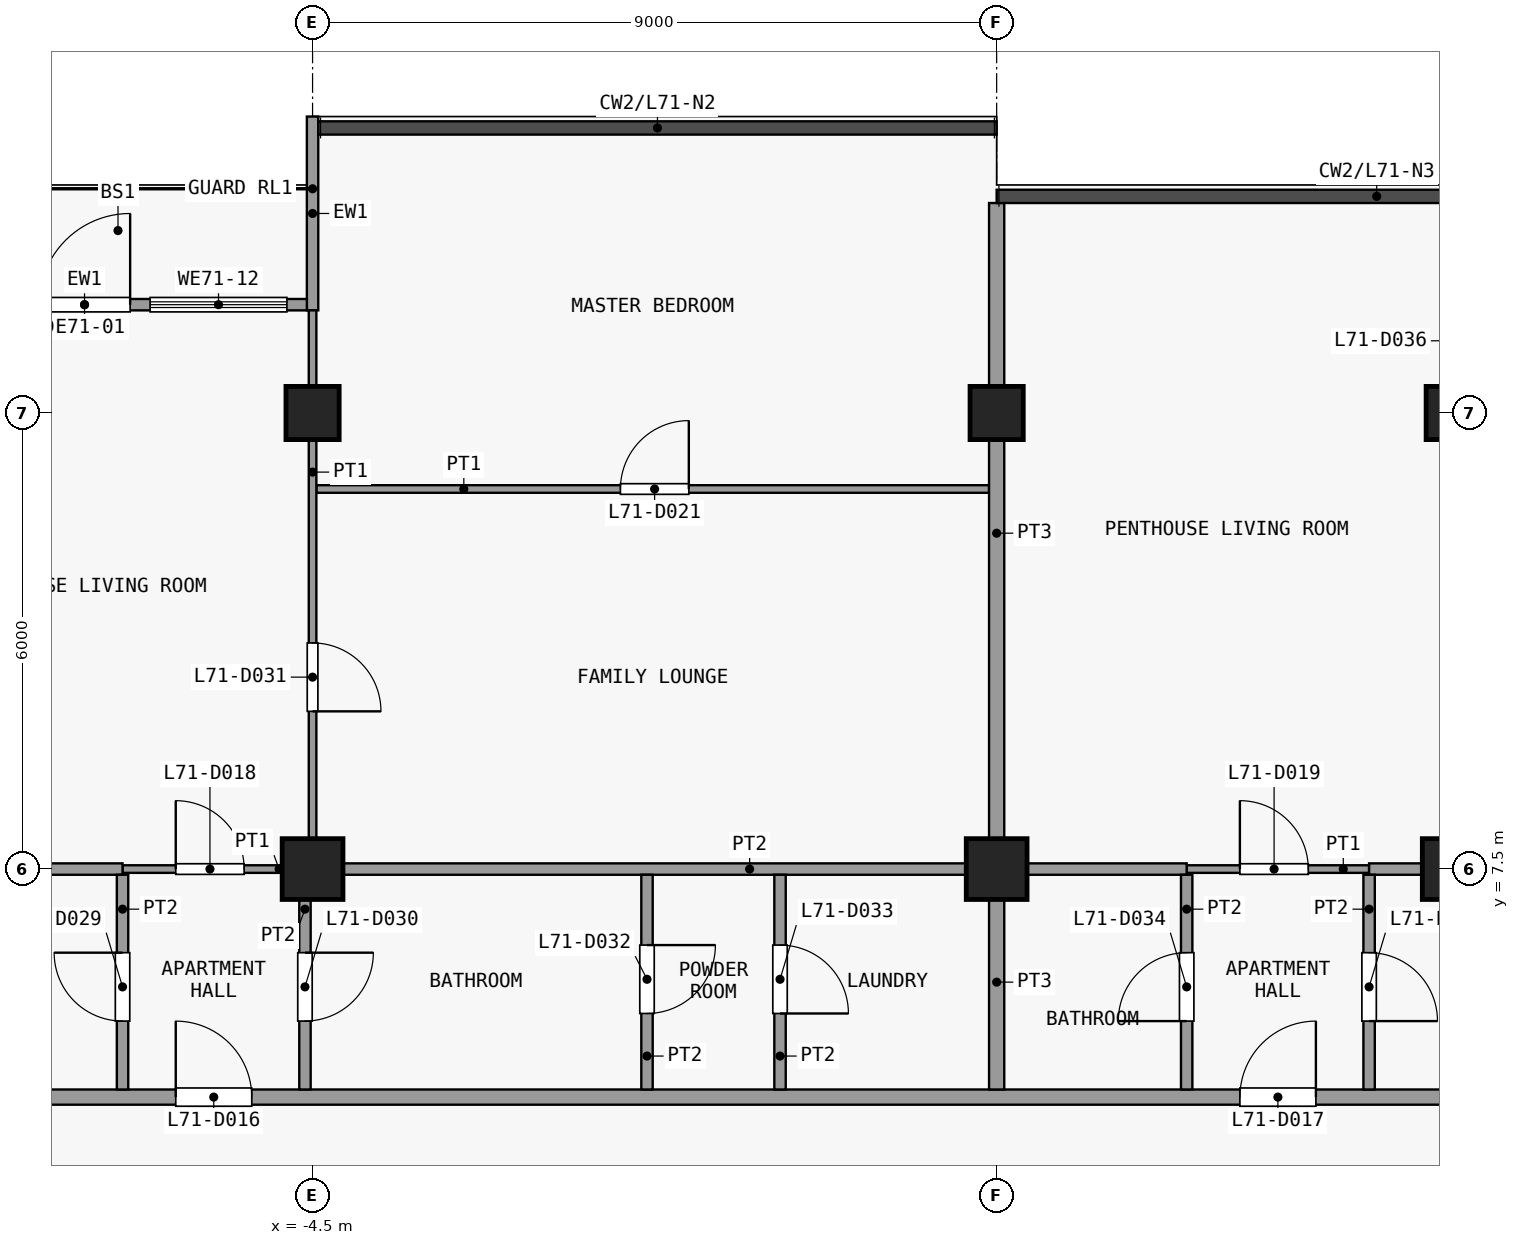
"""IFC4 building model, lengths in metres.
Left out: names, types, materials, properties, quantities, classifications, styles, units other than length and angle.
Written with IfcOpenShell. Run it as: python <this file> out.ifc"""

import sys

from ifc_helpers import new_model, si_unit, direction, frame, frame_2d, origin, origin_2d, place, context, subcontext, project, spatial, rectangle, extrude, element, fill, save


model = new_model("IFC4")
c1 = context("Model", 3, precision=1e-05, world=origin(), true_north=direction((0.0, 1.0)))
c2 = subcontext(c1, "Body", "Model", "MODEL_VIEW")
j1 = project(units=[si_unit("LENGTHUNIT", "METRE"), si_unit("PLANEANGLEUNIT", "RADIAN")], contexts=[c1])
p1 = place(None, origin())
s1 = spatial("IfcSite", under=j1, at=p1, CompositionType="ELEMENT")
p2 = place(p1, origin())
s2 = spatial("IfcBuilding", under=s1, at=p2, CompositionType="ELEMENT")
p3 = place(p2, frame((0.0, 0.0, 280.7)))
s3 = spatial("IfcBuildingStorey", under=s2, at=p3, CompositionType="ELEMENT", Elevation=280.7)
p4 = place(p3, frame((-4.5, 7.5, 0.0), z_axis=(0.0, 0.0, 1.0), x_axis=(1.0, 0.0, 0.0)))
e1 = element("IfcColumn", 1, at=p4, inside=s3, PredefinedType="COLUMN", context=c2, shape_type="SweptSolid", body=[
    extrude(rectangle(XDim=0.8, YDim=0.8, at=origin_2d()), origin(), (0.0, 0.0, 1.0), 3.6),
])
p5 = place(p3, frame((-4.5, 13.5, 0.0), z_axis=(0.0, 0.0, 1.0), x_axis=(1.0, 0.0, 0.0)))
e2 = element("IfcColumn", 2, at=p5, inside=s3, PredefinedType="COLUMN", context=c2, shape_type="SweptSolid", body=[
    extrude(rectangle(XDim=0.7, YDim=0.7, at=origin_2d()), origin(), (0.0, 0.0, 1.0), 3.6),
])
p6 = place(p3, frame((4.5, 7.5, 0.0), z_axis=(0.0, 0.0, 1.0), x_axis=(1.0, 0.0, 0.0)))
e3 = element("IfcColumn", 3, at=p6, inside=s3, PredefinedType="COLUMN", context=c2, shape_type="SweptSolid", body=[
    extrude(rectangle(XDim=0.8, YDim=0.8, at=origin_2d()), origin(), (0.0, 0.0, 1.0), 3.6),
])
p7 = place(p3, frame((4.5, 13.5, 0.0), z_axis=(0.0, 0.0, 1.0), x_axis=(1.0, 0.0, 0.0)))
e4 = element("IfcColumn", 4, at=p7, inside=s3, PredefinedType="COLUMN", context=c2, shape_type="SweptSolid", body=[
    extrude(rectangle(XDim=0.7, YDim=0.7, at=origin_2d()), origin(), (0.0, 0.0, 1.0), 3.6),
])
p8 = place(p3, frame((10.5, 7.5, 0.0), z_axis=(0.0, 0.0, 1.0), x_axis=(1.0, 0.0, 0.0)))
e5 = element("IfcColumn", 5, at=p8, inside=s3, PredefinedType="COLUMN", context=c2, shape_type="SweptSolid", body=[
    extrude(rectangle(XDim=0.8, YDim=0.8, at=origin_2d()), origin(), (0.0, 0.0, 1.0), 3.6),
])
p9 = place(p3, frame((10.5, 13.5, 0.0), z_axis=(0.0, 0.0, 1.0), x_axis=(1.0, 0.0, 0.0)))
e6 = element("IfcColumn", 6, at=p9, inside=s3, PredefinedType="COLUMN", context=c2, shape_type="SweptSolid", body=[
    extrude(rectangle(XDim=0.7, YDim=0.7, at=origin_2d()), origin(), (0.0, 0.0, 1.0), 3.6),
])
p10 = place(p3, frame((-4.5, 14.85, 0.0), z_axis=(0.0, 0.0, 1.0), x_axis=(0.0, 1.0, 0.0)))
e7 = element("IfcWall", 7, at=p10, inside=s3, PredefinedType="SOLIDWALL", context=c2, shape_type="SweptSolid", body=[
    extrude(rectangle(XDim=2.55, YDim=0.15, at=frame_2d((1.275, 0.0))), origin(), (0.0, 0.0, 1.0), 3.3),
])
p11 = place(p3, frame((-10.425, 14.925, 0.0), z_axis=(0.0, 0.0, 1.0), x_axis=(1.0, 0.0, 0.0)))
e8 = element("IfcWall", 8, at=p11, inside=s3, PredefinedType="SOLIDWALL", context=c2, shape_type="SweptSolid", body=[
    extrude(rectangle(XDim=5.85, YDim=0.15, at=frame_2d((2.925, 0.0))), origin(), (0.0, 0.0, 1.0), 3.3),
])
p12 = place(p11, frame((2.325, 0.0, 0.0)))
e9 = element("IfcOpeningElement", 9, at=p12, cuts=e8, PredefinedType="OPENING", context=c2, shape_type="SweptSolid", body=[
    extrude(rectangle(XDim=1.2, YDim=2.4, at=frame_2d((0.6, 1.2))), frame((0.0, 0.085, 0.0), z_axis=(0.0, -1.0, 0.0), x_axis=(1.0, 0.0, 0.0)), (0.0, 0.0, 1.0), 0.17),
])
p13 = place(p11, frame((0.262, 0.0, 0.9)))
e10 = element("IfcOpeningElement", 10, at=p13, cuts=e8, PredefinedType="OPENING", context=c2, shape_type="SweptSolid", body=[
    extrude(rectangle(XDim=1.8, YDim=2.1, at=frame_2d((0.9, 1.05))), frame((0.0, 0.085, 0.0), z_axis=(0.0, -1.0, 0.0), x_axis=(1.0, 0.0, 0.0)), (0.0, 0.0, 1.0), 0.17),
])
p14 = place(p11, frame((3.788, 0.0, 0.9)))
e11 = element("IfcOpeningElement", 11, at=p14, cuts=e8, PredefinedType="OPENING", context=c2, shape_type="SweptSolid", body=[
    extrude(rectangle(XDim=1.8, YDim=2.1, at=frame_2d((0.9, 1.05))), frame((0.0, 0.085, 0.0), z_axis=(0.0, -1.0, 0.0), x_axis=(1.0, 0.0, 0.0)), (0.0, 0.0, 1.0), 0.17),
])
p15 = place(p3, frame((-20.25, 4.5, 0.0), z_axis=(0.0, 0.0, 1.0), x_axis=(1.0, 0.0, 0.0)))
e12 = element("IfcWall", 12, at=p15, inside=s3, PredefinedType="PARTITIONING", context=c2, shape_type="SweptSolid", body=[
    extrude(rectangle(XDim=38.1, YDim=0.2, at=frame_2d((19.05, 0.0))), origin(), (0.0, 0.0, 1.0), 3.3),
])
p16 = place(p15, frame((13.95, 0.0, 0.0)))
e13 = element("IfcOpeningElement", 13, at=p16, cuts=e12, PredefinedType="OPENING", context=c2, shape_type="SweptSolid", body=[
    extrude(rectangle(XDim=1.0, YDim=2.1, at=frame_2d((0.5, 1.05))), frame((0.0, 0.11, 0.0), z_axis=(0.0, -1.0, 0.0), x_axis=(1.0, 0.0, 0.0)), (0.0, 0.0, 1.0), 0.22),
])
p17 = place(p15, frame((27.95, 0.0, 0.0)))
e14 = element("IfcOpeningElement", 14, at=p17, cuts=e12, PredefinedType="OPENING", context=c2, shape_type="SweptSolid", body=[
    extrude(rectangle(XDim=1.0, YDim=2.1, at=frame_2d((0.5, 1.05))), frame((0.0, 0.11, 0.0), z_axis=(0.0, -1.0, 0.0), x_axis=(1.0, 0.0, 0.0)), (0.0, 0.0, 1.0), 0.22),
])
p18 = place(p3, frame((-7.0, 7.5, 0.0), z_axis=(0.0, 0.0, 1.0), x_axis=(1.0, 0.0, 0.0)))
e15 = element("IfcWall", 15, at=p18, inside=s3, PredefinedType="PARTITIONING", context=c2, shape_type="SweptSolid", body=[
    extrude(rectangle(XDim=2.4, YDim=0.1, at=frame_2d((1.2, 0.0))), origin(), (0.0, 0.0, 1.0), 3.3),
])
p19 = place(p18, frame((0.7, 0.0, 0.0)))
e16 = element("IfcOpeningElement", 16, at=p19, cuts=e15, PredefinedType="OPENING", context=c2, shape_type="SweptSolid", body=[
    extrude(rectangle(XDim=0.9, YDim=2.1, at=frame_2d((0.45, 1.05))), frame((0.0, 0.06, 0.0), z_axis=(0.0, -1.0, 0.0), x_axis=(1.0, 0.0, 0.0)), (0.0, 0.0, 1.0), 0.12),
])
p20 = place(p3, frame((7.0, 7.5, 0.0), z_axis=(0.0, 0.0, 1.0), x_axis=(1.0, 0.0, 0.0)))
e17 = element("IfcWall", 17, at=p20, inside=s3, PredefinedType="PARTITIONING", context=c2, shape_type="SweptSolid", body=[
    extrude(rectangle(XDim=2.4, YDim=0.1, at=frame_2d((1.2, 0.0))), origin(), (0.0, 0.0, 1.0), 3.3),
])
p21 = place(p20, frame((0.7, 0.0, 0.0)))
e18 = element("IfcOpeningElement", 18, at=p21, cuts=e17, PredefinedType="OPENING", context=c2, shape_type="SweptSolid", body=[
    extrude(rectangle(XDim=0.9, YDim=2.1, at=frame_2d((0.45, 1.05))), frame((0.0, 0.06, 0.0), z_axis=(0.0, -1.0, 0.0), x_axis=(1.0, 0.0, 0.0)), (0.0, 0.0, 1.0), 0.12),
])
p22 = place(p3, frame((-15.0, 7.5, 0.0), z_axis=(0.0, 0.0, 1.0), x_axis=(1.0, 0.0, 0.0)))
e19 = element("IfcWall", 19, at=p22, inside=s3, PredefinedType="PARTITIONING", context=c2, shape_type="SweptSolid", body=[
    extrude(rectangle(XDim=8.0, YDim=0.15, at=frame_2d((4.0, 0.0))), origin(), (0.0, 0.0, 1.0), 3.3),
])
p23 = place(p3, frame((-4.5, 7.5, 0.0), z_axis=(0.0, 0.0, 1.0), x_axis=(1.0, 0.0, 0.0)))
e20 = element("IfcWall", 20, at=p23, inside=s3, PredefinedType="PARTITIONING", context=c2, shape_type="SweptSolid", body=[
    extrude(rectangle(XDim=11.5, YDim=0.15, at=frame_2d((5.75, 0.0))), origin(), (0.0, 0.0, 1.0), 3.3),
])
p24 = place(p3, frame((9.4, 7.5, 0.0), z_axis=(0.0, 0.0, 1.0), x_axis=(1.0, 0.0, 0.0)))
e21 = element("IfcWall", 21, at=p24, inside=s3, PredefinedType="PARTITIONING", context=c2, shape_type="SweptSolid", body=[
    extrude(rectangle(XDim=7.0, YDim=0.15, at=frame_2d((3.5, 0.0))), origin(), (0.0, 0.0, 1.0), 3.3),
])
p25 = place(p3, frame((-4.45, 12.5, 0.0), z_axis=(0.0, 0.0, 1.0), x_axis=(1.0, 0.0, 0.0)))
e22 = element("IfcWall", 22, at=p25, inside=s3, PredefinedType="PARTITIONING", context=c2, shape_type="SweptSolid", body=[
    extrude(rectangle(XDim=8.85, YDim=0.1, at=frame_2d((4.425, 0.0))), origin(), (0.0, 0.0, 1.0), 3.3),
])
p26 = place(p25, frame((4.0, 0.0, 0.0)))
e23 = element("IfcOpeningElement", 23, at=p26, cuts=e22, PredefinedType="OPENING", context=c2, shape_type="SweptSolid", body=[
    extrude(rectangle(XDim=0.9, YDim=2.1, at=frame_2d((0.45, 1.05))), frame((0.0, 0.06, 0.0), z_axis=(0.0, -1.0, 0.0), x_axis=(1.0, 0.0, 0.0)), (0.0, 0.0, 1.0), 0.12),
])
p27 = place(p3, frame((-7.0, 4.6, 0.0), z_axis=(0.0, 0.0, 1.0), x_axis=(0.0, 1.0, 0.0)))
e24 = element("IfcWall", 24, at=p27, inside=s3, PredefinedType="PARTITIONING", context=c2, shape_type="SweptSolid", body=[
    extrude(rectangle(XDim=2.825, YDim=0.15, at=frame_2d((1.413, 0.0))), origin(), (0.0, 0.0, 1.0), 3.3),
])
p28 = place(p27, frame((0.9, 0.0, 0.0)))
e25 = element("IfcOpeningElement", 25, at=p28, cuts=e24, PredefinedType="OPENING", context=c2, shape_type="SweptSolid", body=[
    extrude(rectangle(XDim=0.9, YDim=2.1, at=frame_2d((0.45, 1.05))), frame((0.0, 0.085, 0.0), z_axis=(0.0, -1.0, 0.0), x_axis=(1.0, 0.0, 0.0)), (0.0, 0.0, 1.0), 0.17),
])
p29 = place(p3, frame((-4.6, 4.6, 0.0), z_axis=(0.0, 0.0, 1.0), x_axis=(0.0, 1.0, 0.0)))
e26 = element("IfcWall", 26, at=p29, inside=s3, PredefinedType="PARTITIONING", context=c2, shape_type="SweptSolid", body=[
    extrude(rectangle(XDim=2.825, YDim=0.15, at=frame_2d((1.413, 0.0))), origin(), (0.0, 0.0, 1.0), 3.3),
])
p30 = place(p29, frame((0.9, 0.0, 0.0)))
e27 = element("IfcOpeningElement", 27, at=p30, cuts=e26, PredefinedType="OPENING", context=c2, shape_type="SweptSolid", body=[
    extrude(rectangle(XDim=0.9, YDim=2.1, at=frame_2d((0.45, 1.05))), frame((0.0, 0.085, 0.0), z_axis=(0.0, -1.0, 0.0), x_axis=(1.0, 0.0, 0.0)), (0.0, 0.0, 1.0), 0.17),
])
p31 = place(p3, frame((-4.5, 7.575, 0.0), z_axis=(0.0, 0.0, 1.0), x_axis=(0.0, 1.0, 0.0)))
e28 = element("IfcWall", 28, at=p31, inside=s3, PredefinedType="PARTITIONING", context=c2, shape_type="SweptSolid", body=[
    extrude(rectangle(XDim=7.275, YDim=0.1, at=frame_2d((3.638, 0.0))), origin(), (0.0, 0.0, 1.0), 3.3),
])
p32 = place(p31, frame((2.0, 0.0, 0.0)))
e29 = element("IfcOpeningElement", 29, at=p32, cuts=e28, PredefinedType="OPENING", context=c2, shape_type="SweptSolid", body=[
    extrude(rectangle(XDim=0.9, YDim=2.1, at=frame_2d((0.45, 1.05))), frame((0.0, 0.06, 0.0), z_axis=(0.0, -1.0, 0.0), x_axis=(1.0, 0.0, 0.0)), (0.0, 0.0, 1.0), 0.12),
])
p33 = place(p3, frame((-0.1, 4.6, 0.0), z_axis=(0.0, 0.0, 1.0), x_axis=(0.0, 1.0, 0.0)))
e30 = element("IfcWall", 30, at=p33, inside=s3, PredefinedType="PARTITIONING", context=c2, shape_type="SweptSolid", body=[
    extrude(rectangle(XDim=2.825, YDim=0.15, at=frame_2d((1.413, 0.0))), origin(), (0.0, 0.0, 1.0), 3.3),
])
p34 = place(p33, frame((1.0, 0.0, 0.0)))
e31 = element("IfcOpeningElement", 31, at=p34, cuts=e30, PredefinedType="OPENING", context=c2, shape_type="SweptSolid", body=[
    extrude(rectangle(XDim=0.9, YDim=2.1, at=frame_2d((0.45, 1.05))), frame((0.0, 0.085, 0.0), z_axis=(0.0, -1.0, 0.0), x_axis=(1.0, 0.0, 0.0)), (0.0, 0.0, 1.0), 0.17),
])
p35 = place(p3, frame((1.65, 4.6, 0.0), z_axis=(0.0, 0.0, 1.0), x_axis=(0.0, 1.0, 0.0)))
e32 = element("IfcWall", 32, at=p35, inside=s3, PredefinedType="PARTITIONING", context=c2, shape_type="SweptSolid", body=[
    extrude(rectangle(XDim=2.825, YDim=0.15, at=frame_2d((1.413, 0.0))), origin(), (0.0, 0.0, 1.0), 3.3),
])
p36 = place(p35, frame((1.0, 0.0, 0.0)))
e33 = element("IfcOpeningElement", 33, at=p36, cuts=e32, PredefinedType="OPENING", context=c2, shape_type="SweptSolid", body=[
    extrude(rectangle(XDim=0.9, YDim=2.1, at=frame_2d((0.45, 1.05))), frame((0.0, 0.085, 0.0), z_axis=(0.0, -1.0, 0.0), x_axis=(1.0, 0.0, 0.0)), (0.0, 0.0, 1.0), 0.17),
])
p37 = place(p3, frame((4.5, 4.6, 0.0), z_axis=(0.0, 0.0, 1.0), x_axis=(0.0, 1.0, 0.0)))
e34 = element("IfcWall", 34, at=p37, inside=s3, PredefinedType="PARTITIONING", context=c2, shape_type="SweptSolid", body=[
    extrude(rectangle(XDim=2.825, YDim=0.2, at=frame_2d((1.413, 0.0))), origin(), (0.0, 0.0, 1.0), 3.3),
])
p38 = place(p3, frame((4.5, 7.575, 0.0), z_axis=(0.0, 0.0, 1.0), x_axis=(0.0, 1.0, 0.0)))
e35 = element("IfcWall", 35, at=p38, inside=s3, PredefinedType="PARTITIONING", context=c2, shape_type="SweptSolid", body=[
    extrude(rectangle(XDim=8.688, YDim=0.2, at=frame_2d((4.344, 0.0))), origin(), (0.0, 0.0, 1.0), 3.3),
])
p39 = place(p3, frame((7.0, 4.6, 0.0), z_axis=(0.0, 0.0, 1.0), x_axis=(0.0, 1.0, 0.0)))
e36 = element("IfcWall", 36, at=p39, inside=s3, PredefinedType="PARTITIONING", context=c2, shape_type="SweptSolid", body=[
    extrude(rectangle(XDim=2.825, YDim=0.15, at=frame_2d((1.413, 0.0))), origin(), (0.0, 0.0, 1.0), 3.3),
])
p40 = place(p39, frame((0.9, 0.0, 0.0)))
e37 = element("IfcOpeningElement", 37, at=p40, cuts=e36, PredefinedType="OPENING", context=c2, shape_type="SweptSolid", body=[
    extrude(rectangle(XDim=0.9, YDim=2.1, at=frame_2d((0.45, 1.05))), frame((0.0, 0.085, 0.0), z_axis=(0.0, -1.0, 0.0), x_axis=(1.0, 0.0, 0.0)), (0.0, 0.0, 1.0), 0.17),
])
p41 = place(p3, frame((9.4, 4.6, 0.0), z_axis=(0.0, 0.0, 1.0), x_axis=(0.0, 1.0, 0.0)))
e38 = element("IfcWall", 38, at=p41, inside=s3, PredefinedType="PARTITIONING", context=c2, shape_type="SweptSolid", body=[
    extrude(rectangle(XDim=2.825, YDim=0.15, at=frame_2d((1.413, 0.0))), origin(), (0.0, 0.0, 1.0), 3.3),
])
p42 = place(p41, frame((0.9, 0.0, 0.0)))
e39 = element("IfcOpeningElement", 39, at=p42, cuts=e38, PredefinedType="OPENING", context=c2, shape_type="SweptSolid", body=[
    extrude(rectangle(XDim=0.9, YDim=2.1, at=frame_2d((0.45, 1.05))), frame((0.0, 0.085, 0.0), z_axis=(0.0, -1.0, 0.0), x_axis=(1.0, 0.0, 0.0)), (0.0, 0.0, 1.0), 0.17),
])
p43 = place(p12, origin())
e40 = element("IfcDoor", 40, at=p43, inside=s3, OperationType="SINGLE_SWING_RIGHT", PredefinedType="DOOR", context=c2, shape_type="SweptSolid", body=[
    extrude(rectangle(XDim=1.2, YDim=2.4, at=frame_2d((0.6, 1.2))), frame((0.0, 0.025, 0.0), z_axis=(0.0, -1.0, 0.0), x_axis=(1.0, 0.0, 0.0)), (0.0, 0.0, 1.0), 0.05),
])
fill(e9, e40)
p44 = place(p14, origin())
e41 = element("IfcWindow", 41, at=p44, inside=s3, PartitioningType="SINGLE_PANEL", PredefinedType="WINDOW", context=c2, shape_type="SweptSolid", body=[
    extrude(rectangle(XDim=1.8, YDim=2.1, at=frame_2d((0.9, 1.05))), frame((0.0, 0.03, 0.0), z_axis=(0.0, -1.0, 0.0), x_axis=(1.0, 0.0, 0.0)), (0.0, 0.0, 1.0), 0.06),
])
fill(e11, e41)
p45 = place(p16, origin())
e42 = element("IfcDoor", 42, at=p45, inside=s3, OperationType="SINGLE_SWING_RIGHT", PredefinedType="DOOR", context=c2, shape_type="SweptSolid", body=[
    extrude(rectangle(XDim=1.0, YDim=2.1, at=frame_2d((0.5, 1.05))), frame((0.0, 0.025, 0.0), z_axis=(0.0, -1.0, 0.0), x_axis=(1.0, 0.0, 0.0)), (0.0, 0.0, 1.0), 0.05),
])
fill(e13, e42)
p46 = place(p17, origin())
e43 = element("IfcDoor", 43, at=p46, inside=s3, OperationType="SINGLE_SWING_LEFT", PredefinedType="DOOR", context=c2, shape_type="SweptSolid", body=[
    extrude(rectangle(XDim=1.0, YDim=2.1, at=frame_2d((0.5, 1.05))), frame((0.0, 0.025, 0.0), z_axis=(0.0, -1.0, 0.0), x_axis=(1.0, 0.0, 0.0)), (0.0, 0.0, 1.0), 0.05),
])
fill(e14, e43)
p47 = place(p19, origin())
e44 = element("IfcDoor", 44, at=p47, inside=s3, OperationType="SINGLE_SWING_RIGHT", PredefinedType="DOOR", context=c2, shape_type="SweptSolid", body=[
    extrude(rectangle(XDim=0.9, YDim=2.1, at=frame_2d((0.45, 1.05))), frame((0.0, 0.025, 0.0), z_axis=(0.0, -1.0, 0.0), x_axis=(1.0, 0.0, 0.0)), (0.0, 0.0, 1.0), 0.05),
])
fill(e16, e44)
p48 = place(p21, origin())
e45 = element("IfcDoor", 45, at=p48, inside=s3, OperationType="SINGLE_SWING_RIGHT", PredefinedType="DOOR", context=c2, shape_type="SweptSolid", body=[
    extrude(rectangle(XDim=0.9, YDim=2.1, at=frame_2d((0.45, 1.05))), frame((0.0, 0.025, 0.0), z_axis=(0.0, -1.0, 0.0), x_axis=(1.0, 0.0, 0.0)), (0.0, 0.0, 1.0), 0.05),
])
fill(e18, e45)
p49 = place(p26, origin())
e46 = element("IfcDoor", 46, at=p49, inside=s3, OperationType="SINGLE_SWING_LEFT", PredefinedType="DOOR", context=c2, shape_type="SweptSolid", body=[
    extrude(rectangle(XDim=0.9, YDim=2.1, at=frame_2d((0.45, 1.05))), frame((0.0, 0.025, 0.0), z_axis=(0.0, -1.0, 0.0), x_axis=(1.0, 0.0, 0.0)), (0.0, 0.0, 1.0), 0.05),
])
fill(e23, e46)
p50 = place(p28, origin())
e47 = element("IfcDoor", 47, at=p50, inside=s3, OperationType="SINGLE_SWING_LEFT", PredefinedType="DOOR", context=c2, shape_type="SweptSolid", body=[
    extrude(rectangle(XDim=0.9, YDim=2.1, at=frame_2d((0.45, 1.05))), frame((0.0, 0.025, 0.0), z_axis=(0.0, -1.0, 0.0), x_axis=(1.0, 0.0, 0.0)), (0.0, 0.0, 1.0), 0.05),
])
fill(e25, e47)
p51 = place(p30, origin())
e48 = element("IfcDoor", 48, at=p51, inside=s3, OperationType="SINGLE_SWING_RIGHT", PredefinedType="DOOR", context=c2, shape_type="SweptSolid", body=[
    extrude(rectangle(XDim=0.9, YDim=2.1, at=frame_2d((0.45, 1.05))), frame((0.0, 0.025, 0.0), z_axis=(0.0, -1.0, 0.0), x_axis=(1.0, 0.0, 0.0)), (0.0, 0.0, 1.0), 0.05),
])
fill(e27, e48)
p52 = place(p32, origin())
e49 = element("IfcDoor", 49, at=p52, inside=s3, OperationType="SINGLE_SWING_LEFT", PredefinedType="DOOR", context=c2, shape_type="SweptSolid", body=[
    extrude(rectangle(XDim=0.9, YDim=2.1, at=frame_2d((0.45, 1.05))), frame((0.0, 0.025, 0.0), z_axis=(0.0, -1.0, 0.0), x_axis=(1.0, 0.0, 0.0)), (0.0, 0.0, 1.0), 0.05),
])
fill(e29, e49)
p53 = place(p34, origin())
e50 = element("IfcDoor", 50, at=p53, inside=s3, OperationType="SINGLE_SWING_RIGHT", PredefinedType="DOOR", context=c2, shape_type="SweptSolid", body=[
    extrude(rectangle(XDim=0.9, YDim=2.1, at=frame_2d((0.45, 1.05))), frame((0.0, 0.025, 0.0), z_axis=(0.0, -1.0, 0.0), x_axis=(1.0, 0.0, 0.0)), (0.0, 0.0, 1.0), 0.05),
])
fill(e31, e50)
p54 = place(p36, origin())
e51 = element("IfcDoor", 51, at=p54, inside=s3, OperationType="SINGLE_SWING_LEFT", PredefinedType="DOOR", context=c2, shape_type="SweptSolid", body=[
    extrude(rectangle(XDim=0.9, YDim=2.1, at=frame_2d((0.45, 1.05))), frame((0.0, 0.025, 0.0), z_axis=(0.0, -1.0, 0.0), x_axis=(1.0, 0.0, 0.0)), (0.0, 0.0, 1.0), 0.05),
])
fill(e33, e51)
p55 = place(p40, origin())
e52 = element("IfcDoor", 52, at=p55, inside=s3, OperationType="SINGLE_SWING_RIGHT", PredefinedType="DOOR", context=c2, shape_type="SweptSolid", body=[
    extrude(rectangle(XDim=0.9, YDim=2.1, at=frame_2d((0.45, 1.05))), frame((0.0, 0.025, 0.0), z_axis=(0.0, -1.0, 0.0), x_axis=(1.0, 0.0, 0.0)), (0.0, 0.0, 1.0), 0.05),
])
fill(e37, e52)
p56 = place(p42, origin())
e53 = element("IfcDoor", 53, at=p56, inside=s3, OperationType="SINGLE_SWING_LEFT", PredefinedType="DOOR", context=c2, shape_type="SweptSolid", body=[
    extrude(rectangle(XDim=0.9, YDim=2.1, at=frame_2d((0.45, 1.05))), frame((0.0, 0.025, 0.0), z_axis=(0.0, -1.0, 0.0), x_axis=(1.0, 0.0, 0.0)), (0.0, 0.0, 1.0), 0.05),
])
fill(e39, e53)
save(model, sys.argv[1])
